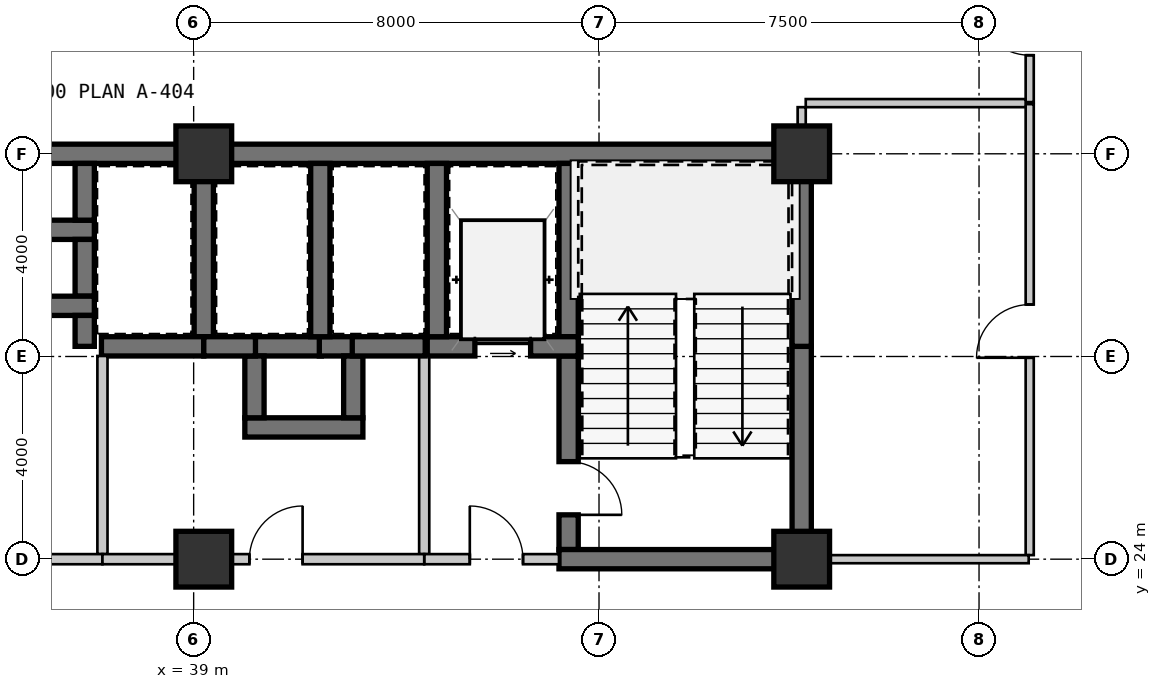
"""IFC4 building model, lengths in metres.
Left out: names, types, materials, properties, quantities, classifications, styles, units other than length and angle.
Written with IfcOpenShell. Run it as: python <this file> out.ifc"""

import sys

from ifc_helpers import new_model, si_unit, direction, frame, frame_2d, origin, origin_2d, place, context, subcontext, project, spatial, rectangle, extrude, source, transform, mapped, element, fill, save


model = new_model("IFC4")
c1 = context("Model", 3, precision=1e-05, world=origin(), true_north=direction((0.0, 1.0)))
c2 = subcontext(c1, "Body", "Model", "MODEL_VIEW")
j1 = project(units=[si_unit("LENGTHUNIT", "METRE"), si_unit("PLANEANGLEUNIT", "RADIAN")], contexts=[c1])
p1 = place(None, origin())
s1 = spatial("IfcSite", under=j1, at=p1, CompositionType="ELEMENT")
p2 = place(p1, origin())
s2 = spatial("IfcBuilding", under=s1, at=p2, CompositionType="ELEMENT")
p3 = place(p2, frame((0.0, 0.0, 4.55)))
s3 = spatial("IfcBuildingStorey", under=s2, at=p3, CompositionType="ELEMENT", Elevation=4.55)
m1 = source(origin(), c2, "Body", "SweptSolid", [
    extrude(rectangle(XDim=1.1, YDim=1.1, at=origin_2d()), origin(), (0.0, 0.0, 1.0), 3.85),
])
for number, where, z_axis, x_axis in (
    (1, (39.2, 24.0, 0.0), (0.0, 0.0, 1.0), (1.0, 0.0, 0.0)),
    (2, (51.0, 24.0, 0.0), (0.0, 0.0, 1.0), (1.0, 0.0, 0.0)),
    (3, (39.2, 32.0, 0.0), (0.0, 0.0, 1.0), (1.0, 0.0, 0.0)),
    (4, (51.0, 32.0, 0.0), (0.0, 0.0, 1.0), (1.0, 0.0, 0.0)),
):
    element("IfcColumn", number, at=place(p3, frame(where, z_axis=z_axis, x_axis=x_axis)), inside=s3, PredefinedType="COLUMN", context=c2, shape_type="MappedRepresentation", body=[
        mapped(m1, transform((0.0, 0.0, 0.0), scale=1.0)),
    ])
m2 = source(origin(), c2, "Body", "SweptSolid", [
    extrude(rectangle(XDim=11.2, YDim=0.38, at=frame_2d((5.6, 0.0))), origin(), (0.0, 0.0, 1.0), 3.59),
])
p4 = place(p3, frame((28.0, 32.0, 0.0), z_axis=(0.0, 0.0, 1.0), x_axis=(1.0, 0.0, 0.0)))
e5 = element("IfcWall", 5, at=p4, inside=s3, PredefinedType="SHEAR", context=c2, shape_type="MappedRepresentation", body=[
    mapped(m2, transform((0.0, 0.0, 0.0), scale=1.0)),
])
m3 = source(origin(), c2, "Body", "SweptSolid", [
    extrude(rectangle(XDim=11.99, YDim=0.38, at=frame_2d((5.995, 0.0))), origin(), (0.0, 0.0, 1.0), 3.59),
])
p5 = place(p3, frame((39.2, 32.0, 0.0), z_axis=(0.0, 0.0, 1.0), x_axis=(1.0, 0.0, 0.0)))
e6 = element("IfcWall", 6, at=p5, inside=s3, PredefinedType="SHEAR", context=c2, shape_type="MappedRepresentation", body=[
    mapped(m3, transform((0.0, 0.0, 0.0), scale=1.0)),
])
m4 = source(origin(), c2, "Body", "SweptSolid", [
    extrude(rectangle(XDim=4.01, YDim=0.38, at=frame_2d((2.005, 0.0))), origin(), (0.0, 0.0, 1.0), 3.59),
])
p6 = place(p3, frame((51.0, 24.19, 0.0), z_axis=(0.0, 0.0, 1.0), x_axis=(0.0, 1.0, 0.0)))
e7 = element("IfcWall", 7, at=p6, inside=s3, PredefinedType="SHEAR", context=c2, shape_type="MappedRepresentation", body=[
    mapped(m4, transform((0.0, 0.0, 0.0), scale=1.0)),
])
m5 = source(origin(), c2, "Body", "SweptSolid", [
    extrude(rectangle(XDim=3.61, YDim=0.38, at=frame_2d((1.805, 0.0))), origin(), (0.0, 0.0, 1.0), 3.59),
])
p7 = place(p3, frame((51.0, 28.2, 0.0), z_axis=(0.0, 0.0, 1.0), x_axis=(0.0, 1.0, 0.0)))
e8 = element("IfcWall", 8, at=p7, inside=s3, PredefinedType="SHEAR", context=c2, shape_type="MappedRepresentation", body=[
    mapped(m5, transform((0.0, 0.0, 0.0), scale=1.0)),
])
m6 = source(origin(), c2, "Body", "SweptSolid", [
    extrude(rectangle(XDim=3.42, YDim=0.38, at=frame_2d((1.71, 0.0))), origin(), (0.0, 0.0, 1.0), 3.59),
])
p8 = place(p3, frame((46.4, 31.81, 0.0), z_axis=(0.0, 0.0, 1.0), x_axis=(0.0, -1.0, 0.0)))
e9 = element("IfcWall", 9, at=p8, inside=s3, PredefinedType="SHEAR", context=c2, shape_type="MappedRepresentation", body=[
    mapped(m6, transform((0.0, 0.0, 0.0), scale=1.0)),
])
m7 = source(origin(), c2, "Body", "SweptSolid", [
    extrude(rectangle(XDim=3.82, YDim=0.38, at=frame_2d((1.91, 0.0))), origin(), (0.0, 0.0, 1.0), 3.59),
])
p9 = place(p3, frame((46.4, 28.01, 0.0), z_axis=(0.0, 0.0, 1.0), x_axis=(0.0, -1.0, 0.0)))
e10 = element("IfcWall", 10, at=p9, inside=s3, PredefinedType="SHEAR", context=c2, shape_type="MappedRepresentation", body=[
    mapped(m7, transform((0.0, 0.0, 0.0), scale=1.0)),
])
m8 = source(origin(), c2, "Body", "SweptSolid", [
    extrude(rectangle(XDim=1.05, YDim=2.1, at=frame_2d((0.525, 1.05))), frame((0.0, 0.2, 0.0), z_axis=(0.0, -1.0, 0.0), x_axis=(1.0, 0.0, 0.0)), (0.0, 0.0, 1.0), 0.4),
])
p10 = place(p9, frame((2.085, 0.0, 0.0)))
e11 = element("IfcOpeningElement", 11, at=p10, cuts=e10, PredefinedType="OPENING", context=c2, shape_type="MappedRepresentation", body=[
    mapped(m8, transform((0.0, 0.0, 0.0), scale=1.0)),
])
m9 = source(origin(), c2, "Body", "SweptSolid", [
    extrude(rectangle(XDim=4.98, YDim=0.38, at=frame_2d((2.49, 0.0))), origin(), (0.0, 0.0, 1.0), 3.59),
])
p11 = place(p3, frame((46.21, 24.0, 0.0), z_axis=(0.0, 0.0, 1.0), x_axis=(1.0, 0.0, 0.0)))
e12 = element("IfcWall", 12, at=p11, inside=s3, PredefinedType="SHEAR", context=c2, shape_type="MappedRepresentation", body=[
    mapped(m9, transform((0.0, 0.0, 0.0), scale=1.0)),
])
m10 = source(origin(), c2, "Body", "SweptSolid", [
    extrude(rectangle(XDim=2.98, YDim=0.38, at=frame_2d((1.49, 0.0))), origin(), (0.0, 0.0, 1.0), 3.59),
])
p12 = place(p3, frame((43.61, 28.2, 0.0), z_axis=(0.0, 0.0, 1.0), x_axis=(1.0, 0.0, 0.0)))
e13 = element("IfcWall", 13, at=p12, inside=s3, PredefinedType="SHEAR", context=c2, shape_type="MappedRepresentation", body=[
    mapped(m10, transform((0.0, 0.0, 0.0), scale=1.0)),
])
m11 = source(origin(), c2, "Body", "SweptSolid", [
    extrude(rectangle(XDim=1.1, YDim=2.15, at=frame_2d((0.55, 1.075))), frame((0.0, 0.2, 0.0), z_axis=(0.0, -1.0, 0.0), x_axis=(1.0, 0.0, 0.0)), (0.0, 0.0, 1.0), 0.4),
])
p13 = place(p12, frame((0.94, 0.0, 0.0)))
e14 = element("IfcOpeningElement", 14, at=p13, cuts=e13, PredefinedType="OPENING", context=c2, shape_type="MappedRepresentation", body=[
    mapped(m11, transform((0.0, 0.0, 0.0), scale=1.0)),
])
p14 = place(p3, frame((43.8, 31.81, 0.0), z_axis=(0.0, 0.0, 1.0), x_axis=(0.0, -1.0, 0.0)))
e15 = element("IfcWall", 15, at=p14, inside=s3, PredefinedType="SHEAR", context=c2, shape_type="MappedRepresentation", body=[
    mapped(m6, transform((0.0, 0.0, 0.0), scale=1.0)),
])
m12 = source(origin(), c2, "Body", "SweptSolid", [
    extrude(rectangle(XDim=3.91, YDim=0.2, at=frame_2d((1.955, 0.0))), origin(), (0.0, 0.0, 1.0), 3.59),
])
p15 = place(p3, frame((43.55, 28.01, 0.0), z_axis=(0.0, 0.0, 1.0), x_axis=(0.0, -1.0, 0.0)))
e16 = element("IfcWall", 16, at=p15, inside=s3, PredefinedType="SOLIDWALL", context=c2, shape_type="MappedRepresentation", body=[
    mapped(m12, transform((0.0, 0.0, 0.0), scale=1.0)),
])
m13 = source(origin(), c2, "Body", "SweptSolid", [
    extrude(rectangle(XDim=2.66, YDim=0.2, at=frame_2d((1.33, 0.0))), origin(), (0.0, 0.0, 1.0), 3.057),
])
p16 = place(p3, frame((43.55, 24.0, 0.0), z_axis=(0.0, 0.0, 1.0), x_axis=(1.0, 0.0, 0.0)))
e17 = element("IfcWall", 17, at=p16, inside=s3, PredefinedType="SOLIDWALL", context=c2, shape_type="MappedRepresentation", body=[
    mapped(m13, transform((0.0, 0.0, 0.0), scale=1.0)),
])
m14 = source(origin(), c2, "Body", "SweptSolid", [
    extrude(rectangle(XDim=1.05, YDim=2.1, at=frame_2d((0.525, 1.05))), frame((0.0, 0.11, 0.0), z_axis=(0.0, -1.0, 0.0), x_axis=(1.0, 0.0, 0.0)), (0.0, 0.0, 1.0), 0.22),
])
p17 = place(p16, frame((0.9, 0.0, 0.0)))
e18 = element("IfcOpeningElement", 18, at=p17, cuts=e17, PredefinedType="OPENING", context=c2, shape_type="MappedRepresentation", body=[
    mapped(m14, transform((0.0, 0.0, 0.0), scale=1.0)),
])
m15 = source(origin(), c2, "Body", "SweptSolid", [
    extrude(rectangle(XDim=2.08, YDim=0.38, at=frame_2d((1.04, 0.0))), origin(), (0.0, 0.0, 1.0), 3.59),
])
p18 = place(p3, frame((34.96, 30.5, 0.0), z_axis=(0.0, 0.0, 1.0), x_axis=(1.0, 0.0, 0.0)))
e19 = element("IfcWall", 19, at=p18, inside=s3, PredefinedType="SHEAR", context=c2, shape_type="MappedRepresentation", body=[
    mapped(m15, transform((0.0, 0.0, 0.0), scale=1.0)),
])
m16 = source(origin(), c2, "Body", "SweptSolid", [
    extrude(rectangle(XDim=1.12, YDim=0.38, at=frame_2d((0.56, 0.0))), origin(), (0.0, 0.0, 1.0), 3.59),
])
for number, where, z_axis, x_axis in (
    (20, (36.85, 30.69, 0.0), (0.0, 0.0, 1.0), (0.0, 1.0, 0.0)),
    (21, (36.85, 29.19, 0.0), (0.0, 0.0, 1.0), (0.0, 1.0, 0.0)),
):
    element("IfcWall", number, at=place(p3, frame(where, z_axis=z_axis, x_axis=x_axis)), inside=s3, PredefinedType="SHEAR", context=c2, shape_type="MappedRepresentation", body=[
        mapped(m16, transform((0.0, 0.0, 0.0), scale=1.0)),
    ])
p19 = place(p3, frame((34.96, 29.0, 0.0), z_axis=(0.0, 0.0, 1.0), x_axis=(1.0, 0.0, 0.0)))
e22 = element("IfcWall", 22, at=p19, inside=s3, PredefinedType="SHEAR", context=c2, shape_type="MappedRepresentation", body=[
    mapped(m15, transform((0.0, 0.0, 0.0), scale=1.0)),
])
m17 = source(origin(), c2, "Body", "SweptSolid", [
    extrude(rectangle(XDim=1.32, YDim=0.38, at=frame_2d((0.66, 0.0))), origin(), (0.0, 0.0, 1.0), 3.59),
])
p20 = place(p3, frame((41.52, 28.2, 0.0), z_axis=(0.0, 0.0, 1.0), x_axis=(-1.0, 0.0, 0.0)))
e23 = element("IfcWall", 23, at=p20, inside=s3, PredefinedType="SHEAR", context=c2, shape_type="MappedRepresentation", body=[
    mapped(m17, transform((0.0, 0.0, 0.0), scale=1.0)),
])
m18 = source(origin(), c2, "Body", "SweptSolid", [
    extrude(rectangle(XDim=0.67, YDim=0.38, at=frame_2d((0.335, 0.0))), origin(), (0.0, 0.0, 1.0), 3.59),
])
p21 = place(p3, frame((42.15, 28.2, 0.0), z_axis=(0.0, 0.0, 1.0), x_axis=(-1.0, 0.0, 0.0)))
e24 = element("IfcWall", 24, at=p21, inside=s3, PredefinedType="SHEAR", context=c2, shape_type="MappedRepresentation", body=[
    mapped(m18, transform((0.0, 0.0, 0.0), scale=1.0)),
])
m19 = source(origin(), c2, "Body", "SweptSolid", [
    extrude(rectangle(XDim=2.33, YDim=0.38, at=frame_2d((1.165, 0.0))), origin(), (0.0, 0.0, 1.0), 3.59),
])
p22 = place(p3, frame((40.01, 26.6, 0.0), z_axis=(0.0, 0.0, 1.0), x_axis=(1.0, 0.0, 0.0)))
e25 = element("IfcWall", 25, at=p22, inside=s3, PredefinedType="SHEAR", context=c2, shape_type="MappedRepresentation", body=[
    mapped(m19, transform((0.0, 0.0, 0.0), scale=1.0)),
])
m20 = source(origin(), c2, "Body", "SweptSolid", [
    extrude(rectangle(XDim=1.22, YDim=0.38, at=frame_2d((0.61, 0.0))), origin(), (0.0, 0.0, 1.0), 3.59),
])
for number, where, z_axis, x_axis in (
    (26, (40.2, 28.01, 0.0), (0.0, 0.0, 1.0), (0.0, -1.0, 0.0)),
    (27, (42.15, 26.79, 0.0), (0.0, 0.0, 1.0), (0.0, 1.0, 0.0)),
):
    element("IfcWall", number, at=place(p3, frame(where, z_axis=z_axis, x_axis=x_axis)), inside=s3, PredefinedType="SHEAR", context=c2, shape_type="MappedRepresentation", body=[
        mapped(m20, transform((0.0, 0.0, 0.0), scale=1.0)),
    ])
p23 = place(p3, frame((39.2, 28.39, 0.0), z_axis=(0.0, 0.0, 1.0), x_axis=(0.0, 1.0, 0.0)))
e28 = element("IfcWall", 28, at=p23, inside=s3, PredefinedType="SHEAR", context=c2, shape_type="MappedRepresentation", body=[
    mapped(m6, transform((0.0, 0.0, 0.0), scale=1.0)),
])
m21 = source(origin(), c2, "Body", "SweptSolid", [
    extrude(rectangle(XDim=0.61, YDim=0.38, at=frame_2d((0.305, 0.0))), origin(), (0.0, 0.0, 1.0), 3.59),
])
p24 = place(p3, frame((36.85, 28.81, 0.0), z_axis=(0.0, 0.0, 1.0), x_axis=(0.0, -1.0, 0.0)))
e29 = element("IfcWall", 29, at=p24, inside=s3, PredefinedType="SHEAR", context=c2, shape_type="MappedRepresentation", body=[
    mapped(m21, transform((0.0, 0.0, 0.0), scale=1.0)),
])
m22 = source(origin(), c2, "Body", "SweptSolid", [
    extrude(rectangle(XDim=2.02, YDim=0.38, at=frame_2d((1.01, 0.0))), origin(), (0.0, 0.0, 1.0), 3.59),
])
p25 = place(p3, frame((37.18, 28.2, 0.0), z_axis=(0.0, 0.0, 1.0), x_axis=(1.0, 0.0, 0.0)))
e30 = element("IfcWall", 30, at=p25, inside=s3, PredefinedType="SHEAR", context=c2, shape_type="MappedRepresentation", body=[
    mapped(m22, transform((0.0, 0.0, 0.0), scale=1.0)),
])
p26 = place(p3, frame((41.5, 28.39, 0.0), z_axis=(0.0, 0.0, 1.0), x_axis=(0.0, 1.0, 0.0)))
e31 = element("IfcWall", 31, at=p26, inside=s3, PredefinedType="SHEAR", context=c2, shape_type="MappedRepresentation", body=[
    mapped(m6, transform((0.0, 0.0, 0.0), scale=1.0)),
])
m23 = source(origin(), c2, "Body", "SweptSolid", [
    extrude(rectangle(XDim=1.02, YDim=0.38, at=frame_2d((0.51, 0.0))), origin(), (0.0, 0.0, 1.0), 3.59),
])
p27 = place(p3, frame((39.2, 28.2, 0.0), z_axis=(0.0, 0.0, 1.0), x_axis=(1.0, 0.0, 0.0)))
e32 = element("IfcWall", 32, at=p27, inside=s3, PredefinedType="SHEAR", context=c2, shape_type="MappedRepresentation", body=[
    mapped(m23, transform((0.0, 0.0, 0.0), scale=1.0)),
])
m24 = source(origin(), c2, "Body", "SweptSolid", [
    extrude(rectangle(XDim=1.44, YDim=0.38, at=frame_2d((0.72, 0.0))), origin(), (0.0, 0.0, 1.0), 3.59),
])
p28 = place(p3, frame((42.13, 28.2, 0.0), z_axis=(0.0, 0.0, 1.0), x_axis=(1.0, 0.0, 0.0)))
e33 = element("IfcWall", 33, at=p28, inside=s3, PredefinedType="SHEAR", context=c2, shape_type="MappedRepresentation", body=[
    mapped(m24, transform((0.0, 0.0, 0.0), scale=1.0)),
])
p29 = place(p3, frame((37.2, 28.01, 0.0), z_axis=(0.0, 0.0, 1.0), x_axis=(0.0, -1.0, 0.0)))
e34 = element("IfcWall", 34, at=p29, inside=s3, PredefinedType="SOLIDWALL", context=c2, shape_type="MappedRepresentation", body=[
    mapped(m12, transform((0.0, 0.0, 0.0), scale=1.0)),
])
m25 = source(origin(), c2, "Body", "SweptSolid", [
    extrude(rectangle(XDim=6.4, YDim=0.2, at=frame_2d((3.2, 0.0))), origin(), (0.0, 0.0, 1.0), 3.13),
])
p30 = place(p3, frame((37.2, 24.0, 0.0), z_axis=(0.0, 0.0, 1.0), x_axis=(-1.0, 0.0, 0.0)))
e35 = element("IfcWall", 35, at=p30, inside=s3, PredefinedType="SOLIDWALL", context=c2, shape_type="MappedRepresentation", body=[
    mapped(m25, transform((0.0, 0.0, 0.0), scale=1.0)),
])
p31 = place(p30, frame((2.675, 0.0, 0.0)))
e36 = element("IfcOpeningElement", 36, at=p31, cuts=e35, PredefinedType="OPENING", context=c2, shape_type="MappedRepresentation", body=[
    mapped(m14, transform((0.0, 0.0, 0.0), scale=1.0)),
])
m26 = source(origin(), c2, "Body", "SweptSolid", [
    extrude(rectangle(XDim=4.35, YDim=0.2, at=frame_2d((2.175, 0.0))), origin(), (0.0, 0.0, 1.0), 3.057),
])
p32 = place(p3, frame((43.55, 24.0, 0.0), z_axis=(0.0, 0.0, 1.0), x_axis=(-1.0, 0.0, 0.0)))
e37 = element("IfcWall", 37, at=p32, inside=s3, PredefinedType="SOLIDWALL", context=c2, shape_type="MappedRepresentation", body=[
    mapped(m26, transform((0.0, 0.0, 0.0), scale=1.0)),
])
p33 = place(p32, frame((2.4, 0.0, 0.0)))
e38 = element("IfcOpeningElement", 38, at=p33, cuts=e37, PredefinedType="OPENING", context=c2, shape_type="MappedRepresentation", body=[
    mapped(m14, transform((0.0, 0.0, 0.0), scale=1.0)),
])
m27 = source(origin(), c2, "Body", "SweptSolid", [
    extrude(rectangle(XDim=2.0, YDim=0.2, at=frame_2d((1.0, 0.0))), origin(), (0.0, 0.0, 1.0), 3.13),
])
p34 = place(p3, frame((39.2, 24.0, 0.0), z_axis=(0.0, 0.0, 1.0), x_axis=(-1.0, 0.0, 0.0)))
e39 = element("IfcWall", 39, at=p34, inside=s3, PredefinedType="SOLIDWALL", context=c2, shape_type="MappedRepresentation", body=[
    mapped(m27, transform((0.0, 0.0, 0.0), scale=1.0)),
])
m28 = source(origin(), c2, "Body", "SweptSolid", [
    extrude(rectangle(XDim=8.9, YDim=0.16, at=frame_2d((4.45, 0.0))), origin(), (0.0, 0.0, 1.0), 3.59),
])
p35 = place(p3, frame((55.5, 24.08, 0.0), z_axis=(0.0, 0.0, 1.0), x_axis=(0.0, 1.0, 0.0)))
e40 = element("IfcWall", 40, at=p35, inside=s3, PredefinedType="PARTITIONING", context=c2, shape_type="MappedRepresentation", body=[
    mapped(m28, transform((0.0, 0.0, 0.0), scale=1.0)),
])
m29 = source(origin(), c2, "Body", "SweptSolid", [
    extrude(rectangle(XDim=1.05, YDim=2.1, at=frame_2d((0.525, 1.05))), frame((0.0, 0.09, 0.0), z_axis=(0.0, -1.0, 0.0), x_axis=(1.0, 0.0, 0.0)), (0.0, 0.0, 1.0), 0.18),
])
p36 = place(p35, frame((3.895, 0.0, 0.0)))
e41 = element("IfcOpeningElement", 41, at=p36, cuts=e40, PredefinedType="OPENING", context=c2, shape_type="MappedRepresentation", body=[
    mapped(m29, transform((0.0, 0.0, 0.0), scale=1.0)),
])
m30 = source(origin(), c2, "Body", "SweptSolid", [
    extrude(rectangle(XDim=4.29, YDim=0.16, at=frame_2d((2.145, 0.0))), origin(), (0.0, 0.0, 1.0), 3.59),
])
p37 = place(p3, frame((51.19, 24.0, 0.0), z_axis=(0.0, 0.0, 1.0), x_axis=(1.0, 0.0, 0.0)))
e42 = element("IfcWall", 42, at=p37, inside=s3, PredefinedType="PARTITIONING", context=c2, shape_type="MappedRepresentation", body=[
    mapped(m30, transform((0.0, 0.0, 0.0), scale=1.0)),
])
m31 = source(origin(), c2, "Body", "SweptSolid", [
    extrude(rectangle(XDim=2.9, YDim=0.16, at=frame_2d((1.45, 0.0))), origin(), (0.0, 0.0, 1.0), 3.59),
])
p38 = place(p3, frame((55.5, 33.02, 0.0), z_axis=(0.0, 0.0, 1.0), x_axis=(0.0, 1.0, 0.0)))
e43 = element("IfcWall", 43, at=p38, inside=s3, PredefinedType="PARTITIONING", context=c2, shape_type="MappedRepresentation", body=[
    mapped(m31, transform((0.0, 0.0, 0.0), scale=1.0)),
])
p39 = place(p38, frame((0.925, 0.0, 0.0)))
e44 = element("IfcOpeningElement", 44, at=p39, cuts=e43, PredefinedType="OPENING", context=c2, shape_type="MappedRepresentation", body=[
    mapped(m29, transform((0.0, 0.0, 0.0), scale=1.0)),
])
m32 = source(origin(), c2, "Body", "SweptSolid", [
    extrude(rectangle(XDim=4.34, YDim=0.16, at=frame_2d((2.17, 0.0))), origin(), (0.0, 0.0, 1.0), 3.59),
])
p40 = place(p3, frame((51.08, 33.0, 0.0), z_axis=(0.0, 0.0, 1.0), x_axis=(1.0, 0.0, 0.0)))
e45 = element("IfcWall", 45, at=p40, inside=s3, PredefinedType="PARTITIONING", context=c2, shape_type="MappedRepresentation", body=[
    mapped(m32, transform((0.0, 0.0, 0.0), scale=1.0)),
])
m33 = source(origin(), c2, "Body", "SweptSolid", [
    extrude(rectangle(XDim=0.73, YDim=0.16, at=frame_2d((0.365, 0.0))), origin(), (0.0, 0.0, 1.0), 3.59),
])
p41 = place(p3, frame((51.0, 32.19, 0.0), z_axis=(0.0, 0.0, 1.0), x_axis=(0.0, 1.0, 0.0)))
e46 = element("IfcWall", 46, at=p41, inside=s3, PredefinedType="PARTITIONING", context=c2, shape_type="MappedRepresentation", body=[
    mapped(m33, transform((0.0, 0.0, 0.0), scale=1.0)),
])
m34 = source(origin(), c2, "Body", "SweptSolid", [
    extrude(rectangle(XDim=1.05, YDim=2.1, at=frame_2d((0.525, 1.05))), frame((0.0, 0.025, 0.0), z_axis=(0.0, -1.0, 0.0), x_axis=(1.0, 0.0, 0.0)), (0.0, 0.0, 1.0), 0.05),
])
p42 = place(p10, origin())
e47 = element("IfcDoor", 47, at=p42, inside=s3, OperationType="SINGLE_SWING_RIGHT", PredefinedType="DOOR", context=c2, shape_type="MappedRepresentation", body=[
    mapped(m34, transform((0.0, 0.0, 0.0), scale=1.0)),
])
fill(e11, e47)
m35 = source(origin(), c2, "Body", "SweptSolid", [
    extrude(rectangle(XDim=1.1, YDim=2.15, at=frame_2d((0.55, 1.075))), frame((0.0, 0.025, 0.0), z_axis=(0.0, -1.0, 0.0), x_axis=(1.0, 0.0, 0.0)), (0.0, 0.0, 1.0), 0.05),
])
p43 = place(p13, origin())
e48 = element("IfcDoor", 48, at=p43, inside=s3, OperationType="SLIDING_TO_LEFT", PredefinedType="DOOR", context=c2, shape_type="MappedRepresentation", body=[
    mapped(m35, transform((0.0, 0.0, 0.0), scale=1.0)),
])
fill(e14, e48)
p44 = place(p17, origin())
e49 = element("IfcDoor", 49, at=p44, inside=s3, OperationType="SINGLE_SWING_LEFT", PredefinedType="DOOR", context=c2, shape_type="MappedRepresentation", body=[
    mapped(m34, transform((0.0, 0.0, 0.0), scale=1.0)),
])
fill(e18, e49)
p45 = place(p33, frame((1.05, 0.0, 0.0), z_axis=(0.0, 0.0, 1.0), x_axis=(-1.0, 0.0, 0.0)))
e50 = element("IfcDoor", 50, at=p45, inside=s3, OperationType="SINGLE_SWING_RIGHT", PredefinedType="DOOR", context=c2, shape_type="MappedRepresentation", body=[
    mapped(m34, transform((0.0, 0.0, 0.0), scale=1.0)),
])
fill(e38, e50)
p46 = place(p36, origin())
e51 = element("IfcDoor", 51, at=p46, inside=s3, OperationType="SINGLE_SWING_LEFT", PredefinedType="DOOR", context=c2, shape_type="MappedRepresentation", body=[
    mapped(m34, transform((0.0, 0.0, 0.0), scale=1.0)),
])
fill(e41, e51)
p47 = place(p39, origin())
e52 = element("IfcDoor", 52, at=p47, inside=s3, OperationType="SINGLE_SWING_RIGHT", PredefinedType="DOOR", context=c2, shape_type="MappedRepresentation", body=[
    mapped(m34, transform((0.0, 0.0, 0.0), scale=1.0)),
])
fill(e44, e52)
save(model, sys.argv[1])
